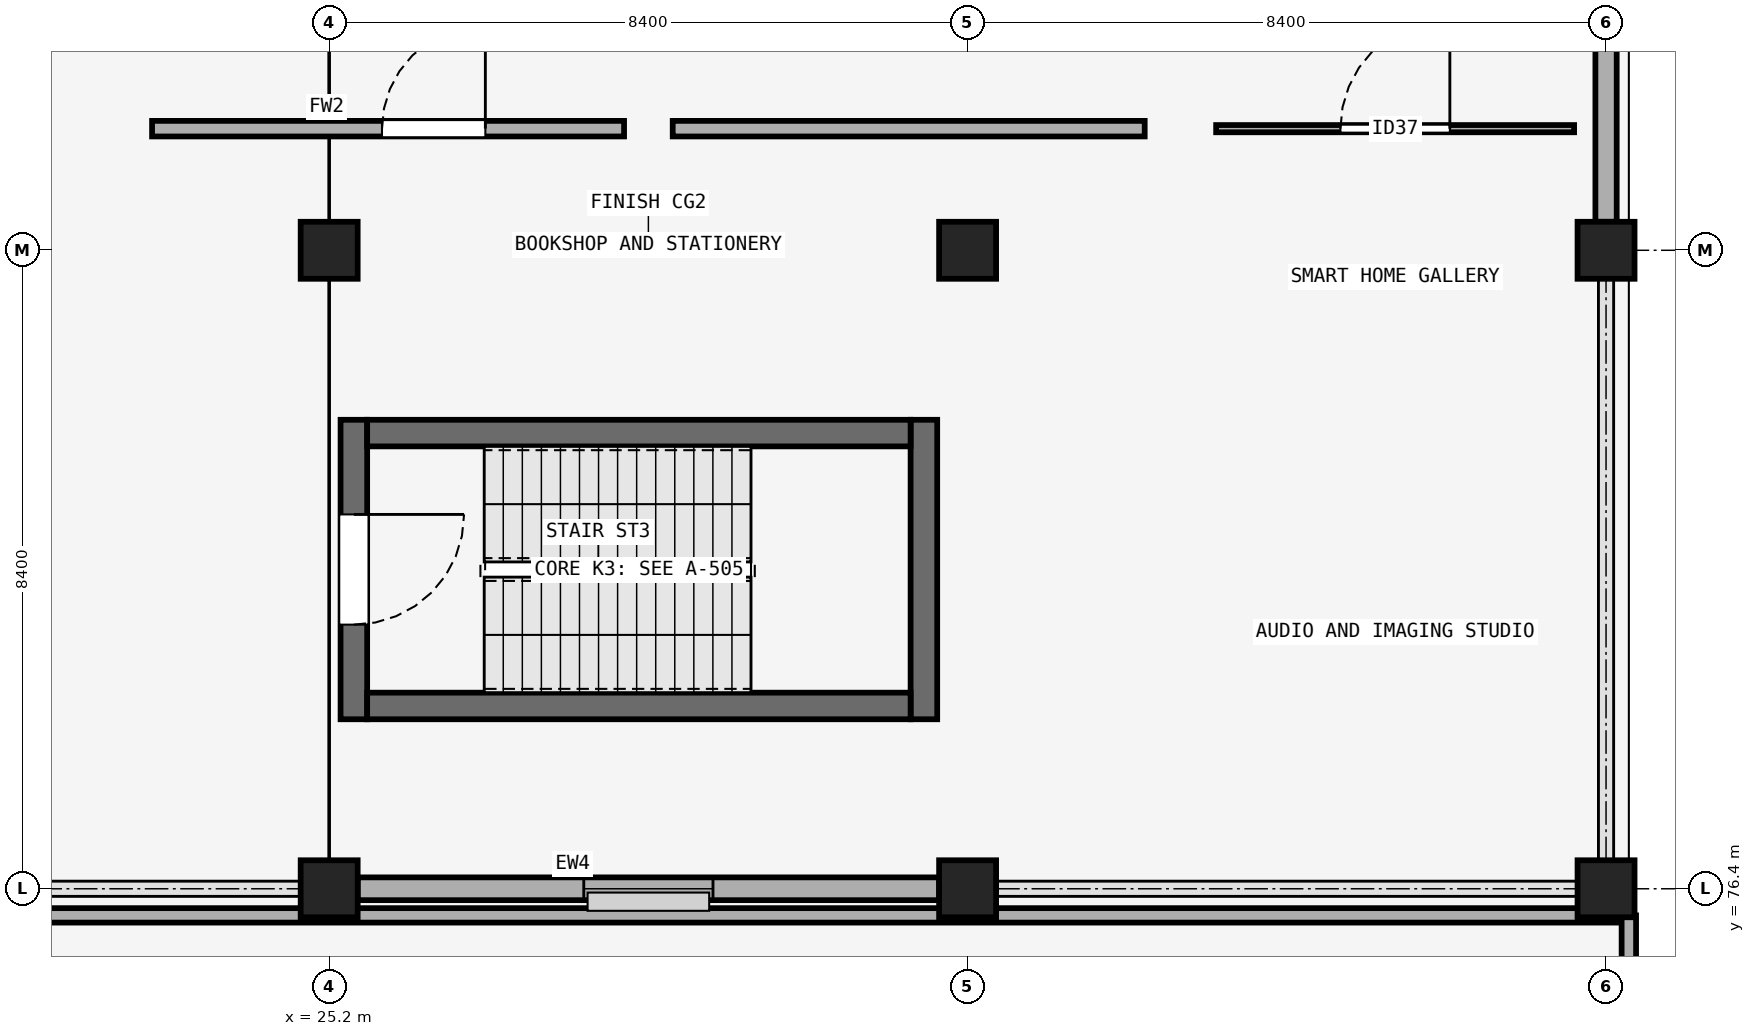
"""IFC4 building model, lengths in metres.
Left out: names, types, materials, properties, quantities, classifications, styles, units other than length and angle.
Written with IfcOpenShell. Run it as: python <this file> out.ifc"""

import sys

from ifc_helpers import new_model, si_unit, direction, frame, frame_2d, origin, origin_2d, place, context, subcontext, project, spatial, rectangle, extrude, element, fill, save


model = new_model("IFC4")
c1 = context("Model", 3, precision=1e-05, world=origin(), true_north=direction((0.0, 1.0)))
c2 = subcontext(c1, "Body", "Model", "MODEL_VIEW")
j1 = project(units=[si_unit("LENGTHUNIT", "METRE"), si_unit("PLANEANGLEUNIT", "RADIAN")], contexts=[c1])
p1 = place(None, origin())
s1 = spatial("IfcSite", under=j1, at=p1, CompositionType="ELEMENT")
p2 = place(p1, origin())
s2 = spatial("IfcBuilding", under=s1, at=p2, CompositionType="ELEMENT")
p3 = place(p2, frame((0.0, 0.0, 23.4)))
s3 = spatial("IfcBuildingStorey", under=s2, at=p3, CompositionType="ELEMENT", Elevation=23.4)
for number, where, z_axis, x_axis in (
    (1, (25.2, 76.4, 0.0), (0.0, 0.0, 1.0), (1.0, 0.0, 0.0)),
    (2, (33.6, 76.4, 0.0), (0.0, 0.0, 1.0), (1.0, 0.0, 0.0)),
    (3, (42.0, 76.4, 0.0), (0.0, 0.0, 1.0), (1.0, 0.0, 0.0)),
    (4, (25.2, 84.8, 0.0), (0.0, 0.0, 1.0), (1.0, 0.0, 0.0)),
    (5, (33.6, 84.8, 0.0), (0.0, 0.0, 1.0), (1.0, 0.0, 0.0)),
    (6, (42.0, 84.8, 0.0), (0.0, 0.0, 1.0), (1.0, 0.0, 0.0)),
):
    element("IfcColumn", number, at=place(p3, frame(where, z_axis=z_axis, x_axis=x_axis)), inside=s3, PredefinedType="COLUMN", context=c2, shape_type="SweptSolid", body=[
        extrude(rectangle(XDim=0.75, YDim=0.75, at=origin_2d()), origin(), (0.0, 0.0, 1.0), 4.5),
    ])
p4 = place(p3, frame((25.575, 76.4, 0.0), z_axis=(0.0, 0.0, 1.0), x_axis=(1.0, 0.0, 0.0)))
e7 = element("IfcWall", 7, at=p4, inside=s3, PredefinedType="SOLIDWALL", context=c2, shape_type="SweptSolid", body=[
    extrude(rectangle(XDim=7.65, YDim=0.3, at=frame_2d((3.825, 0.0))), origin(), (0.0, 0.0, 1.0), 3.45),
])
p5 = place(p4, frame((2.975, 0.0, 0.95)))
e8 = element("IfcOpeningElement", 8, at=p5, cuts=e7, PredefinedType="OPENING", context=c2, shape_type="SweptSolid", body=[
    extrude(rectangle(XDim=1.7, YDim=1.85, at=frame_2d((0.85, 0.925))), frame((0.0, 0.16, 0.0), z_axis=(0.0, -1.0, 0.0), x_axis=(1.0, 0.0, 0.0)), (0.0, 0.0, 1.0), 0.32),
])
p6 = place(p3, frame((42.0, 85.175, 0.0), z_axis=(0.0, 0.0, 1.0), x_axis=(0.0, 1.0, 0.0)))
e9 = element("IfcWall", 9, at=p6, inside=s3, PredefinedType="SOLIDWALL", context=c2, shape_type="SweptSolid", body=[
    extrude(rectangle(XDim=7.65, YDim=0.28, at=frame_2d((3.825, 0.0))), origin(), (0.0, 0.0, 1.0), 3.45),
])
p7 = place(p6, frame((2.825, 0.0, 0.95)))
e10 = element("IfcOpeningElement", 10, at=p7, cuts=e9, PredefinedType="OPENING", context=c2, shape_type="SweptSolid", body=[
    extrude(rectangle(XDim=2.0, YDim=1.35, at=frame_2d((1.0, 0.675))), frame((0.0, 0.15, 0.0), z_axis=(0.0, -1.0, 0.0), x_axis=(1.0, 0.0, 0.0)), (0.0, 0.0, 1.0), 0.3),
])
p8 = place(p3, frame((42.3, 76.05, 0.0), z_axis=(0.0, 0.0, 1.0), x_axis=(-1.0, 0.0, 0.0)))
e11 = element("IfcWall", 11, at=p8, inside=s3, PredefinedType="PARAPET", context=c2, shape_type="SweptSolid", body=[
    extrude(rectangle(XDim=42.6, YDim=0.19, at=frame_2d((21.3, 0.0))), origin(), (0.0, 0.0, 1.0), 0.95),
])
p9 = place(p3, frame((42.3, 67.7, 0.0), z_axis=(0.0, 0.0, 1.0), x_axis=(0.0, 1.0, 0.0)))
e12 = element("IfcWall", 12, at=p9, inside=s3, PredefinedType="PARAPET", context=c2, shape_type="SweptSolid", body=[
    extrude(rectangle(XDim=8.35, YDim=0.19, at=frame_2d((4.175, 0.0))), origin(), (0.0, 0.0, 1.0), 0.95),
])
p10 = place(p3, frame((25.525, 82.57, 0.0), z_axis=(0.0, 0.0, 1.0), x_axis=(0.0, -1.0, 0.0)))
e13 = element("IfcWall", 13, at=p10, inside=s3, PredefinedType="SHEAR", context=c2, shape_type="SweptSolid", body=[
    extrude(rectangle(XDim=3.94, YDim=0.35, at=frame_2d((1.97, 0.0))), origin(), (0.0, 0.0, 1.0), 4.2),
])
p11 = place(p10, frame((1.245, 0.0, 0.0)))
e14 = element("IfcOpeningElement", 14, at=p11, cuts=e13, PredefinedType="OPENING", context=c2, shape_type="SweptSolid", body=[
    extrude(rectangle(XDim=1.45, YDim=2.2, at=frame_2d((0.725, 1.1))), frame((0.0, 0.185, 0.0), z_axis=(0.0, -1.0, 0.0), x_axis=(1.0, 0.0, 0.0)), (0.0, 0.0, 1.0), 0.37),
])
p12 = place(p3, frame((33.025, 78.63, 0.0), z_axis=(0.0, 0.0, 1.0), x_axis=(0.0, 1.0, 0.0)))
e15 = element("IfcWall", 15, at=p12, inside=s3, PredefinedType="SHEAR", context=c2, shape_type="SweptSolid", body=[
    extrude(rectangle(XDim=3.94, YDim=0.35, at=frame_2d((1.97, 0.0))), origin(), (0.0, 0.0, 1.0), 4.2),
])
for number, where, z_axis, x_axis in (
    (16, (25.7, 78.805, 0.0), (0.0, 0.0, 1.0), (1.0, 0.0, 0.0)),
    (17, (25.7, 82.395, 0.0), (0.0, 0.0, 1.0), (1.0, 0.0, 0.0)),
):
    element("IfcWall", number, at=place(p3, frame(where, z_axis=z_axis, x_axis=x_axis)), inside=s3, PredefinedType="SHEAR", context=c2, shape_type="SweptSolid", body=[
        extrude(rectangle(XDim=7.15, YDim=0.35, at=frame_2d((3.575, 0.0))), origin(), (0.0, 0.0, 1.0), 4.2),
    ])
p13 = place(p3, frame((22.87, 86.4, 0.0), z_axis=(0.0, 0.0, 1.0), x_axis=(1.0, 0.0, 0.0)))
e18 = element("IfcWall", 18, at=p13, inside=s3, PredefinedType="PARTITIONING", context=c2, shape_type="SweptSolid", body=[
    extrude(rectangle(XDim=6.21, YDim=0.205, at=frame_2d((3.105, 0.0))), origin(), (0.0, 0.0, 1.0), 4.2),
])
p14 = place(p13, frame((3.025, 0.0, 0.0)))
e19 = element("IfcOpeningElement", 19, at=p14, cuts=e18, PredefinedType="OPENING", context=c2, shape_type="SweptSolid", body=[
    extrude(rectangle(XDim=1.36, YDim=2.34, at=frame_2d((0.68, 1.17))), frame((0.0, 0.113, 0.0), z_axis=(0.0, -1.0, 0.0), x_axis=(1.0, 0.0, 0.0)), (0.0, 0.0, 1.0), 0.225),
])
p15 = place(p3, frame((29.72, 86.4, 0.0), z_axis=(0.0, 0.0, 1.0), x_axis=(1.0, 0.0, 0.0)))
e20 = element("IfcWall", 20, at=p15, inside=s3, PredefinedType="PARTITIONING", context=c2, shape_type="SweptSolid", body=[
    extrude(rectangle(XDim=6.21, YDim=0.205, at=frame_2d((3.105, 0.0))), origin(), (0.0, 0.0, 1.0), 3.45),
])
p16 = place(p3, frame((36.87, 86.4, 0.0), z_axis=(0.0, 0.0, 1.0), x_axis=(1.0, 0.0, 0.0)))
e21 = element("IfcWall", 21, at=p16, inside=s3, PredefinedType="PARTITIONING", context=c2, shape_type="SweptSolid", body=[
    extrude(rectangle(XDim=4.71, YDim=0.095, at=frame_2d((2.355, 0.0))), origin(), (0.0, 0.0, 1.0), 4.2),
])
p17 = place(p16, frame((1.635, 0.0, 0.0)))
e22 = element("IfcOpeningElement", 22, at=p17, cuts=e21, PredefinedType="OPENING", context=c2, shape_type="SweptSolid", body=[
    extrude(rectangle(XDim=1.44, YDim=2.34, at=frame_2d((0.72, 1.17))), frame((0.0, 0.057, 0.0), z_axis=(0.0, -1.0, 0.0), x_axis=(1.0, 0.0, 0.0)), (0.0, 0.0, 1.0), 0.115),
])
p18 = place(p5, origin())
e23 = element("IfcWindow", 23, at=p18, inside=s3, PartitioningType="DOUBLE_PANEL_VERTICAL", PredefinedType="WINDOW", context=c2, shape_type="SweptSolid", body=[
    extrude(rectangle(XDim=1.7, YDim=1.85, at=frame_2d((0.85, 0.925))), frame((0.0, 0.03, 0.0), z_axis=(0.0, -1.0, 0.0), x_axis=(1.0, 0.0, 0.0)), (0.0, 0.0, 1.0), 0.06),
])
fill(e8, e23)
p19 = place(p11, origin())
e24 = element("IfcDoor", 24, at=p19, inside=s3, OperationType="SINGLE_SWING_LEFT", PredefinedType="DOOR", context=c2, shape_type="SweptSolid", body=[
    extrude(rectangle(XDim=1.45, YDim=2.2, at=frame_2d((0.725, 1.1))), frame((0.0, 0.025, 0.0), z_axis=(0.0, -1.0, 0.0), x_axis=(1.0, 0.0, 0.0)), (0.0, 0.0, 1.0), 0.05),
])
fill(e14, e24)
p20 = place(p14, origin())
e25 = element("IfcDoor", 25, at=p20, inside=s3, OperationType="SINGLE_SWING_RIGHT", PredefinedType="DOOR", context=c2, shape_type="SweptSolid", body=[
    extrude(rectangle(XDim=1.36, YDim=2.34, at=frame_2d((0.68, 1.17))), frame((0.0, 0.025, 0.0), z_axis=(0.0, -1.0, 0.0), x_axis=(1.0, 0.0, 0.0)), (0.0, 0.0, 1.0), 0.05),
])
fill(e19, e25)
p21 = place(p17, origin())
e26 = element("IfcDoor", 26, at=p21, inside=s3, OperationType="SINGLE_SWING_RIGHT", PredefinedType="DOOR", context=c2, shape_type="SweptSolid", body=[
    extrude(rectangle(XDim=1.44, YDim=2.34, at=frame_2d((0.72, 1.17))), frame((0.0, 0.025, 0.0), z_axis=(0.0, -1.0, 0.0), x_axis=(1.0, 0.0, 0.0)), (0.0, 0.0, 1.0), 0.05),
])
fill(e22, e26)
save(model, sys.argv[1])
